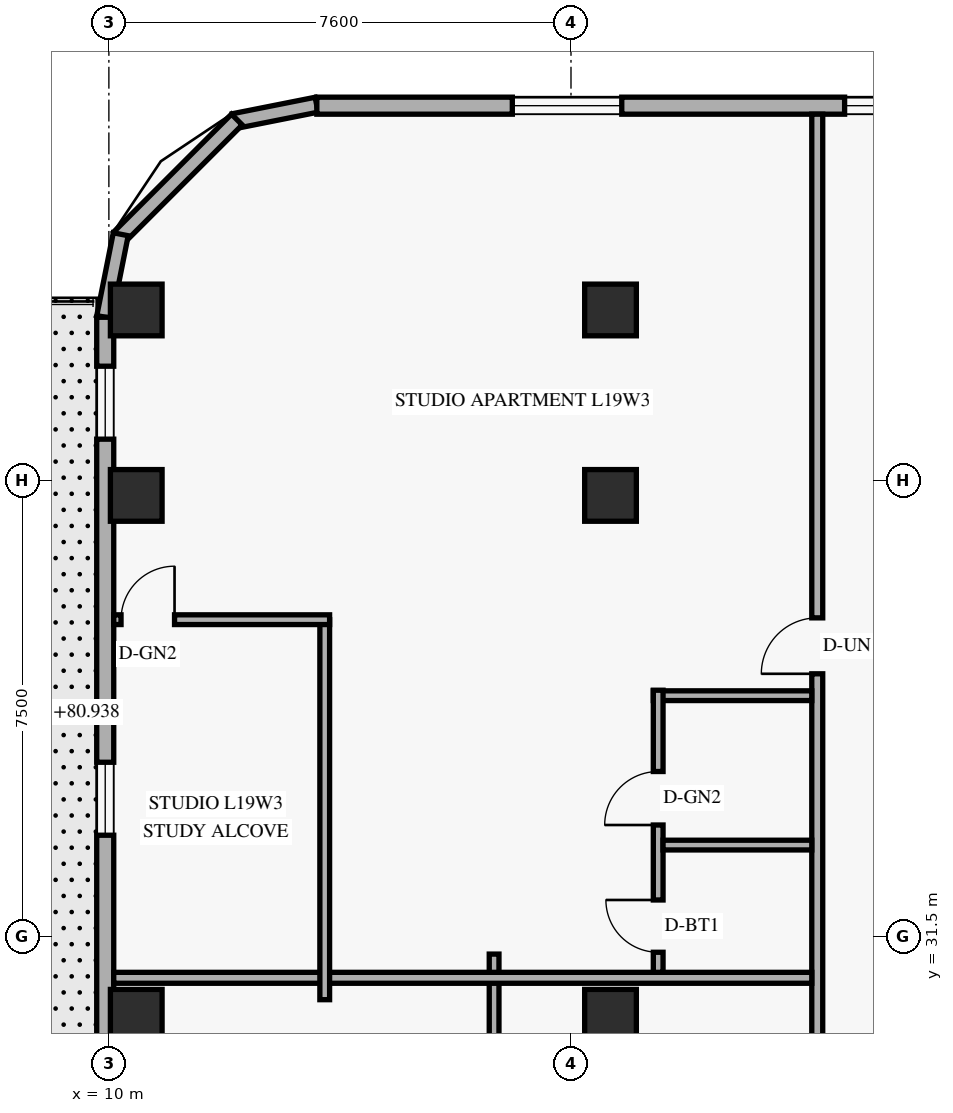
"""IFC4 building model, lengths in metres.
Left out: names, types, materials, properties, quantities, classifications, styles, units other than length and angle.
Written with IfcOpenShell. Run it as: python <this file> out.ifc"""

import sys

from ifc_helpers import new_model, si_unit, direction, frame, frame_2d, origin, origin_2d, place, context, subcontext, project, spatial, rectangle, extrude, element, fill, save


model = new_model("IFC4")
c1 = context("Model", 3, precision=1e-05, world=origin(), true_north=direction((0.0, 1.0)))
c2 = subcontext(c1, "Body", "Model", "MODEL_VIEW")
j1 = project(units=[si_unit("LENGTHUNIT", "METRE"), si_unit("PLANEANGLEUNIT", "RADIAN")], contexts=[c1])
p1 = place(None, origin())
s1 = spatial("IfcSite", under=j1, at=p1, CompositionType="ELEMENT")
p2 = place(p1, origin())
s2 = spatial("IfcBuilding", under=s1, at=p2, CompositionType="ELEMENT")
p3 = place(p2, frame((0.0, 0.0, 76.8)))
s3 = spatial("IfcBuildingStorey", under=s2, at=p3, CompositionType="ELEMENT", Elevation=76.8)
for number, where, z_axis, x_axis in (
    (1, (10.45, 30.2, 0.0), (0.0, 0.0, 1.0), (1.0, 0.0, 0.0)),
    (2, (10.45, 38.75, 0.0), (0.0, 0.0, 1.0), (1.0, 0.0, 0.0)),
    (3, (10.45, 41.8, 0.0), (0.0, 0.0, 1.0), (1.0, 0.0, 0.0)),
    (4, (18.25, 30.2, 0.0), (0.0, 0.0, 1.0), (1.0, 0.0, 0.0)),
    (5, (18.25, 38.75, 0.0), (0.0, 0.0, 1.0), (1.0, 0.0, 0.0)),
    (6, (18.25, 41.8, 0.0), (0.0, 0.0, 1.0), (1.0, 0.0, 0.0)),
):
    element("IfcColumn", number, at=place(p3, frame(where, z_axis=z_axis, x_axis=x_axis)), inside=s3, PredefinedType="COLUMN", context=c2, shape_type="SweptSolid", body=[
        extrude(rectangle(XDim=0.85, YDim=0.85, at=origin_2d()), origin(), (0.0, 0.0, 1.0), 3.6),
    ])
p4 = place(p3, frame((13.417, 45.176, 0.0), z_axis=(0.0, 0.0, 1.0), x_axis=(-0.980809899341, -0.19496651342, 0.0)))
e7 = element("IfcWall", 7, at=p4, inside=s3, PredefinedType="SOLIDWALL", context=c2, shape_type="SweptSolid", body=[
    extrude(rectangle(XDim=1.389, YDim=0.25, at=frame_2d((0.694, 0.0))), origin(), (0.0, 0.0, 1.0), 3.36),
])
p5 = place(p3, frame((12.105, 44.932, 0.0), z_axis=(0.0, 0.0, 1.0), x_axis=(-0.707151344399, -0.707062215165, 0.0)))
e8 = element("IfcWall", 8, at=p5, inside=s3, PredefinedType="SOLIDWALL", context=c2, shape_type="SweptSolid", body=[
    extrude(rectangle(XDim=2.739, YDim=0.25, at=frame_2d((1.37, 0.0))), origin(), (0.0, 0.0, 1.0), 3.36),
])
p6 = place(p3, frame((10.195, 43.045, 0.0), z_axis=(0.0, 0.0, 1.0), x_axis=(-0.195000137217, -0.980803214965, 0.0)))
e9 = element("IfcWall", 9, at=p6, inside=s3, PredefinedType="SOLIDWALL", context=c2, shape_type="SweptSolid", body=[
    extrude(rectangle(XDim=1.388, YDim=0.25, at=frame_2d((0.694, 0.0))), origin(), (0.0, 0.0, 1.0), 3.36),
])
p7 = place(p3, frame((49.98, 45.16, 0.0), z_axis=(0.0, 0.0, 1.0), x_axis=(-1.0, 0.0, 0.0)))
e10 = element("IfcWall", 10, at=p7, inside=s3, PredefinedType="SOLIDWALL", context=c2, shape_type="SweptSolid", body=[
    extrude(rectangle(XDim=36.56, YDim=0.28, at=frame_2d((18.28, 0.0))), origin(), (0.0, 0.0, 1.0), 3.36),
])
p8 = place(p7, frame((31.545, 0.0, 0.85)))
e11 = element("IfcOpeningElement", 11, at=p8, cuts=e10, PredefinedType="OPENING", context=c2, shape_type="SweptSolid", body=[
    extrude(rectangle(XDim=1.8, YDim=1.6, at=frame_2d((0.9, 0.8))), frame((0.0, 0.15, 0.0), z_axis=(0.0, -1.0, 0.0), x_axis=(1.0, 0.0, 0.0)), (0.0, 0.0, 1.0), 0.3),
])
p9 = place(p7, frame((26.68, 0.0, 0.85)))
e12 = element("IfcOpeningElement", 12, at=p9, cuts=e10, PredefinedType="OPENING", context=c2, shape_type="SweptSolid", body=[
    extrude(rectangle(XDim=1.2, YDim=1.5, at=frame_2d((0.6, 0.75))), frame((0.0, 0.15, 0.0), z_axis=(0.0, -1.0, 0.0), x_axis=(1.0, 0.0, 0.0)), (0.0, 0.0, 1.0), 0.3),
])
p10 = place(p7, frame((22.237, 0.0, 0.85)))
e13 = element("IfcOpeningElement", 13, at=p10, cuts=e10, PredefinedType="OPENING", context=c2, shape_type="SweptSolid", body=[
    extrude(rectangle(XDim=1.8, YDim=1.6, at=frame_2d((0.9, 0.8))), frame((0.0, 0.15, 0.0), z_axis=(0.0, -1.0, 0.0), x_axis=(1.0, 0.0, 0.0)), (0.0, 0.0, 1.0), 0.3),
])
p11 = place(p7, frame((16.402, 0.0, 0.85)))
e14 = element("IfcOpeningElement", 14, at=p11, cuts=e10, PredefinedType="OPENING", context=c2, shape_type="SweptSolid", body=[
    extrude(rectangle(XDim=1.8, YDim=1.6, at=frame_2d((0.9, 0.8))), frame((0.0, 0.15, 0.0), z_axis=(0.0, -1.0, 0.0), x_axis=(1.0, 0.0, 0.0)), (0.0, 0.0, 1.0), 0.3),
])
p12 = place(p7, frame((12.895, 0.0, 0.85)))
e15 = element("IfcOpeningElement", 15, at=p12, cuts=e10, PredefinedType="OPENING", context=c2, shape_type="SweptSolid", body=[
    extrude(rectangle(XDim=1.2, YDim=1.5, at=frame_2d((0.6, 0.75))), frame((0.0, 0.15, 0.0), z_axis=(0.0, -1.0, 0.0), x_axis=(1.0, 0.0, 0.0)), (0.0, 0.0, 1.0), 0.3),
])
p13 = place(p7, frame((5.315, 0.0, 0.85)))
e16 = element("IfcOpeningElement", 16, at=p13, cuts=e10, PredefinedType="OPENING", context=c2, shape_type="SweptSolid", body=[
    extrude(rectangle(XDim=1.8, YDim=1.6, at=frame_2d((0.9, 0.8))), frame((0.0, 0.15, 0.0), z_axis=(0.0, -1.0, 0.0), x_axis=(1.0, 0.0, 0.0)), (0.0, 0.0, 1.0), 0.3),
])
p14 = place(p3, frame((9.94, 41.68, 0.0), z_axis=(0.0, 0.0, 1.0), x_axis=(0.0, -1.0, 0.0)))
e17 = element("IfcWall", 17, at=p14, inside=s3, PredefinedType="SOLIDWALL", context=c2, shape_type="SweptSolid", body=[
    extrude(rectangle(XDim=35.36, YDim=0.28, at=frame_2d((17.68, 0.0))), origin(), (0.0, 0.0, 1.0), 3.36),
])
p15 = place(p14, frame((17.16, 0.0, 0.0)))
e18 = element("IfcOpeningElement", 18, at=p15, cuts=e17, PredefinedType="OPENING", context=c2, shape_type="SweptSolid", body=[
    extrude(rectangle(XDim=1.05, YDim=2.15, at=frame_2d((0.525, 1.075))), frame((0.0, 0.15, 0.0), z_axis=(0.0, -1.0, 0.0), x_axis=(1.0, 0.0, 0.0)), (0.0, 0.0, 1.0), 0.3),
])
p16 = place(p14, frame((12.63, 0.0, 0.0)))
e19 = element("IfcOpeningElement", 19, at=p16, cuts=e17, PredefinedType="OPENING", context=c2, shape_type="SweptSolid", body=[
    extrude(rectangle(XDim=1.4, YDim=2.15, at=frame_2d((0.7, 1.075))), frame((0.0, 0.15, 0.0), z_axis=(0.0, -1.0, 0.0), x_axis=(1.0, 0.0, 0.0)), (0.0, 0.0, 1.0), 0.3),
])
p17 = place(p14, frame((29.314, 0.0, 0.85)))
e20 = element("IfcOpeningElement", 20, at=p17, cuts=e17, PredefinedType="OPENING", context=c2, shape_type="SweptSolid", body=[
    extrude(rectangle(XDim=1.2, YDim=1.5, at=frame_2d((0.6, 0.75))), frame((0.0, 0.15, 0.0), z_axis=(0.0, -1.0, 0.0), x_axis=(1.0, 0.0, 0.0)), (0.0, 0.0, 1.0), 0.3),
])
p18 = place(p14, frame((25.993, 0.0, 0.85)))
e21 = element("IfcOpeningElement", 21, at=p18, cuts=e17, PredefinedType="OPENING", context=c2, shape_type="SweptSolid", body=[
    extrude(rectangle(XDim=1.2, YDim=1.5, at=frame_2d((0.6, 0.75))), frame((0.0, 0.15, 0.0), z_axis=(0.0, -1.0, 0.0), x_axis=(1.0, 0.0, 0.0)), (0.0, 0.0, 1.0), 0.3),
])
p19 = place(p14, frame((21.881, 0.0, 0.85)))
e22 = element("IfcOpeningElement", 22, at=p19, cuts=e17, PredefinedType="OPENING", context=c2, shape_type="SweptSolid", body=[
    extrude(rectangle(XDim=1.2, YDim=1.5, at=frame_2d((0.6, 0.75))), frame((0.0, 0.15, 0.0), z_axis=(0.0, -1.0, 0.0), x_axis=(1.0, 0.0, 0.0)), (0.0, 0.0, 1.0), 0.3),
])
p20 = place(p14, frame((19.401, 0.0, 0.85)))
e23 = element("IfcOpeningElement", 23, at=p20, cuts=e17, PredefinedType="OPENING", context=c2, shape_type="SweptSolid", body=[
    extrude(rectangle(XDim=1.2, YDim=1.5, at=frame_2d((0.6, 0.75))), frame((0.0, 0.15, 0.0), z_axis=(0.0, -1.0, 0.0), x_axis=(1.0, 0.0, 0.0)), (0.0, 0.0, 1.0), 0.3),
])
p21 = place(p14, frame((7.319, 0.0, 0.85)))
e24 = element("IfcOpeningElement", 24, at=p21, cuts=e17, PredefinedType="OPENING", context=c2, shape_type="SweptSolid", body=[
    extrude(rectangle(XDim=1.2, YDim=1.5, at=frame_2d((0.6, 0.75))), frame((0.0, 0.15, 0.0), z_axis=(0.0, -1.0, 0.0), x_axis=(1.0, 0.0, 0.0)), (0.0, 0.0, 1.0), 0.3),
])
p22 = place(p14, frame((0.805, 0.0, 0.85)))
e25 = element("IfcOpeningElement", 25, at=p22, cuts=e17, PredefinedType="OPENING", context=c2, shape_type="SweptSolid", body=[
    extrude(rectangle(XDim=1.2, YDim=1.5, at=frame_2d((0.6, 0.75))), frame((0.0, 0.15, 0.0), z_axis=(0.0, -1.0, 0.0), x_axis=(1.0, 0.0, 0.0)), (0.0, 0.0, 1.0), 0.3),
])
p23 = place(p3, frame((21.65, 2.98, 0.0), z_axis=(0.0, 0.0, 1.0), x_axis=(0.0, 1.0, 0.0)))
e26 = element("IfcWall", 26, at=p23, inside=s3, PredefinedType="STANDARD", context=c2, shape_type="SweptSolid", body=[
    extrude(rectangle(XDim=42.04, YDim=0.18, at=frame_2d((21.02, 0.0))), origin(), (0.0, 0.0, 1.0), 2.731),
])
p24 = place(p23, frame((8.984, 0.0, 0.0)))
e27 = element("IfcOpeningElement", 27, at=p24, cuts=e26, PredefinedType="OPENING", context=c2, shape_type="SweptSolid", body=[
    extrude(rectangle(XDim=0.92, YDim=2.15, at=frame_2d((0.46, 1.075))), frame((0.0, 0.1, 0.0), z_axis=(0.0, -1.0, 0.0), x_axis=(1.0, 0.0, 0.0)), (0.0, 0.0, 1.0), 0.2),
])
p25 = place(p23, frame((18.246, 0.0, 0.0)))
e28 = element("IfcOpeningElement", 28, at=p25, cuts=e26, PredefinedType="OPENING", context=c2, shape_type="SweptSolid", body=[
    extrude(rectangle(XDim=0.92, YDim=2.15, at=frame_2d((0.46, 1.075))), frame((0.0, 0.1, 0.0), z_axis=(0.0, -1.0, 0.0), x_axis=(1.0, 0.0, 0.0)), (0.0, 0.0, 1.0), 0.2),
])
p26 = place(p23, frame((32.836, 0.0, 0.0)))
e29 = element("IfcOpeningElement", 29, at=p26, cuts=e26, PredefinedType="OPENING", context=c2, shape_type="SweptSolid", body=[
    extrude(rectangle(XDim=0.92, YDim=2.15, at=frame_2d((0.46, 1.075))), frame((0.0, 0.1, 0.0), z_axis=(0.0, -1.0, 0.0), x_axis=(1.0, 0.0, 0.0)), (0.0, 0.0, 1.0), 0.2),
])
p27 = place(p3, frame((16.335, 27.096, 0.0), z_axis=(0.0, 0.0, 1.0), x_axis=(0.0, 1.0, 0.0)))
e30 = element("IfcWall", 30, at=p27, inside=s3, PredefinedType="PARTITIONING", context=c2, shape_type="SweptSolid", body=[
    extrude(rectangle(XDim=4.11, YDim=0.16, at=frame_2d((2.055, 0.0))), origin(), (0.0, 0.0, 1.0), 2.731),
])
p28 = place(p3, frame((10.08, 30.816, 0.0), z_axis=(0.0, 0.0, 1.0), x_axis=(1.0, 0.0, 0.0)))
e31 = element("IfcWall", 31, at=p28, inside=s3, PredefinedType="PARTITIONING", context=c2, shape_type="SweptSolid", body=[
    extrude(rectangle(XDim=11.48, YDim=0.18, at=frame_2d((5.74, 0.0))), origin(), (0.0, 0.0, 1.0), 2.731),
])
p29 = place(p3, frame((18.954, 35.456, 0.0), z_axis=(0.0, 0.0, 1.0), x_axis=(1.0, 0.0, 0.0)))
e32 = element("IfcWall", 32, at=p29, inside=s3, PredefinedType="PLUMBINGWALL", context=c2, shape_type="SweptSolid", body=[
    extrude(rectangle(XDim=2.606, YDim=0.16, at=frame_2d((1.303, 0.0))), origin(), (0.0, 0.0, 1.0), 3.36),
])
p30 = place(p3, frame((19.034, 30.906, 0.0), z_axis=(0.0, 0.0, 1.0), x_axis=(0.0, 1.0, 0.0)))
e33 = element("IfcWall", 33, at=p30, inside=s3, PredefinedType="PLUMBINGWALL", context=c2, shape_type="SweptSolid", body=[
    extrude(rectangle(XDim=4.64, YDim=0.16, at=frame_2d((2.32, 0.0))), origin(), (0.0, 0.0, 1.0), 2.988),
])
p31 = place(p30, frame((0.33, 0.0, 0.0)))
e34 = element("IfcOpeningElement", 34, at=p31, cuts=e33, PredefinedType="OPENING", context=c2, shape_type="SweptSolid", body=[
    extrude(rectangle(XDim=0.86, YDim=2.12, at=frame_2d((0.43, 1.06))), frame((0.0, 0.09, 0.0), z_axis=(0.0, -1.0, 0.0), x_axis=(1.0, 0.0, 0.0)), (0.0, 0.0, 1.0), 0.18),
])
p32 = place(p30, frame((2.423, 0.0, 0.0)))
e35 = element("IfcOpeningElement", 35, at=p32, cuts=e33, PredefinedType="OPENING", context=c2, shape_type="SweptSolid", body=[
    extrude(rectangle(XDim=0.88, YDim=2.12, at=frame_2d((0.44, 1.06))), frame((0.0, 0.09, 0.0), z_axis=(0.0, -1.0, 0.0), x_axis=(1.0, 0.0, 0.0)), (0.0, 0.0, 1.0), 0.18),
])
p33 = place(p3, frame((19.114, 32.999, 0.0), z_axis=(0.0, 0.0, 1.0), x_axis=(1.0, 0.0, 0.0)))
e36 = element("IfcWall", 36, at=p33, inside=s3, PredefinedType="PLUMBINGWALL", context=c2, shape_type="SweptSolid", body=[
    extrude(rectangle(XDim=2.446, YDim=0.16, at=frame_2d((1.223, 0.0))), origin(), (0.0, 0.0, 1.0), 3.36),
])
p34 = place(p3, frame((13.55, 30.456, 0.0), z_axis=(0.0, 0.0, 1.0), x_axis=(0.0, 1.0, 0.0)))
e37 = element("IfcWall", 37, at=p34, inside=s3, PredefinedType="PARTITIONING", context=c2, shape_type="SweptSolid", body=[
    extrude(rectangle(XDim=6.25, YDim=0.16, at=frame_2d((3.125, 0.0))), origin(), (0.0, 0.0, 1.0), 2.988),
])
p35 = place(p3, frame((10.08, 36.706, 0.0), z_axis=(0.0, 0.0, 1.0), x_axis=(1.0, 0.0, 0.0)))
e38 = element("IfcWall", 38, at=p35, inside=s3, PredefinedType="PARTITIONING", context=c2, shape_type="SweptSolid", body=[
    extrude(rectangle(XDim=3.55, YDim=0.16, at=frame_2d((1.775, 0.0))), origin(), (0.0, 0.0, 1.0), 2.809),
])
p36 = place(p35, frame((0.12, 0.0, 0.0)))
e39 = element("IfcOpeningElement", 39, at=p36, cuts=e38, PredefinedType="OPENING", context=c2, shape_type="SweptSolid", body=[
    extrude(rectangle(XDim=0.88, YDim=2.12, at=frame_2d((0.44, 1.06))), frame((0.0, 0.09, 0.0), z_axis=(0.0, -1.0, 0.0), x_axis=(1.0, 0.0, 0.0)), (0.0, 0.0, 1.0), 0.18),
])
p37 = place(p8, origin())
e40 = element("IfcWindow", 40, at=p37, inside=s3, PartitioningType="SINGLE_PANEL", PredefinedType="WINDOW", context=c2, shape_type="SweptSolid", body=[
    extrude(rectangle(XDim=1.8, YDim=1.6, at=frame_2d((0.9, 0.8))), frame((0.0, 0.03, 0.0), z_axis=(0.0, -1.0, 0.0), x_axis=(1.0, 0.0, 0.0)), (0.0, 0.0, 1.0), 0.06),
])
fill(e11, e40)
p38 = place(p9, origin())
e41 = element("IfcWindow", 41, at=p38, inside=s3, PartitioningType="SINGLE_PANEL", PredefinedType="WINDOW", context=c2, shape_type="SweptSolid", body=[
    extrude(rectangle(XDim=1.2, YDim=1.5, at=frame_2d((0.6, 0.75))), frame((0.0, 0.03, 0.0), z_axis=(0.0, -1.0, 0.0), x_axis=(1.0, 0.0, 0.0)), (0.0, 0.0, 1.0), 0.06),
])
fill(e12, e41)
p39 = place(p21, origin())
e42 = element("IfcWindow", 42, at=p39, inside=s3, PartitioningType="SINGLE_PANEL", PredefinedType="WINDOW", context=c2, shape_type="SweptSolid", body=[
    extrude(rectangle(XDim=1.2, YDim=1.5, at=frame_2d((0.6, 0.75))), frame((0.0, 0.03, 0.0), z_axis=(0.0, -1.0, 0.0), x_axis=(1.0, 0.0, 0.0)), (0.0, 0.0, 1.0), 0.06),
])
fill(e24, e42)
p40 = place(p22, origin())
e43 = element("IfcWindow", 43, at=p40, inside=s3, PartitioningType="SINGLE_PANEL", PredefinedType="WINDOW", context=c2, shape_type="SweptSolid", body=[
    extrude(rectangle(XDim=1.2, YDim=1.5, at=frame_2d((0.6, 0.75))), frame((0.0, 0.03, 0.0), z_axis=(0.0, -1.0, 0.0), x_axis=(1.0, 0.0, 0.0)), (0.0, 0.0, 1.0), 0.06),
])
fill(e25, e43)
p41 = place(p36, origin())
e44 = element("IfcDoor", 44, at=p41, inside=s3, OperationType="SINGLE_SWING_RIGHT", PredefinedType="DOOR", context=c2, shape_type="SweptSolid", body=[
    extrude(rectangle(XDim=0.88, YDim=2.12, at=frame_2d((0.44, 1.06))), frame((0.0, 0.025, 0.0), z_axis=(0.0, -1.0, 0.0), x_axis=(1.0, 0.0, 0.0)), (0.0, 0.0, 1.0), 0.05),
])
fill(e39, e44)
p42 = place(p26, origin())
e45 = element("IfcDoor", 45, at=p42, inside=s3, OperationType="SINGLE_SWING_LEFT", PredefinedType="DOOR", context=c2, shape_type="SweptSolid", body=[
    extrude(rectangle(XDim=0.92, YDim=2.15, at=frame_2d((0.46, 1.075))), frame((0.0, 0.025, 0.0), z_axis=(0.0, -1.0, 0.0), x_axis=(1.0, 0.0, 0.0)), (0.0, 0.0, 1.0), 0.05),
])
fill(e29, e45)
p43 = place(p31, origin())
e46 = element("IfcDoor", 46, at=p43, inside=s3, OperationType="SINGLE_SWING_RIGHT", PredefinedType="DOOR", context=c2, shape_type="SweptSolid", body=[
    extrude(rectangle(XDim=0.86, YDim=2.12, at=frame_2d((0.43, 1.06))), frame((0.0, 0.025, 0.0), z_axis=(0.0, -1.0, 0.0), x_axis=(1.0, 0.0, 0.0)), (0.0, 0.0, 1.0), 0.05),
])
fill(e34, e46)
p44 = place(p32, origin())
e47 = element("IfcDoor", 47, at=p44, inside=s3, OperationType="SINGLE_SWING_LEFT", PredefinedType="DOOR", context=c2, shape_type="SweptSolid", body=[
    extrude(rectangle(XDim=0.88, YDim=2.12, at=frame_2d((0.44, 1.06))), frame((0.0, 0.025, 0.0), z_axis=(0.0, -1.0, 0.0), x_axis=(1.0, 0.0, 0.0)), (0.0, 0.0, 1.0), 0.05),
])
fill(e35, e47)
save(model, sys.argv[1])
